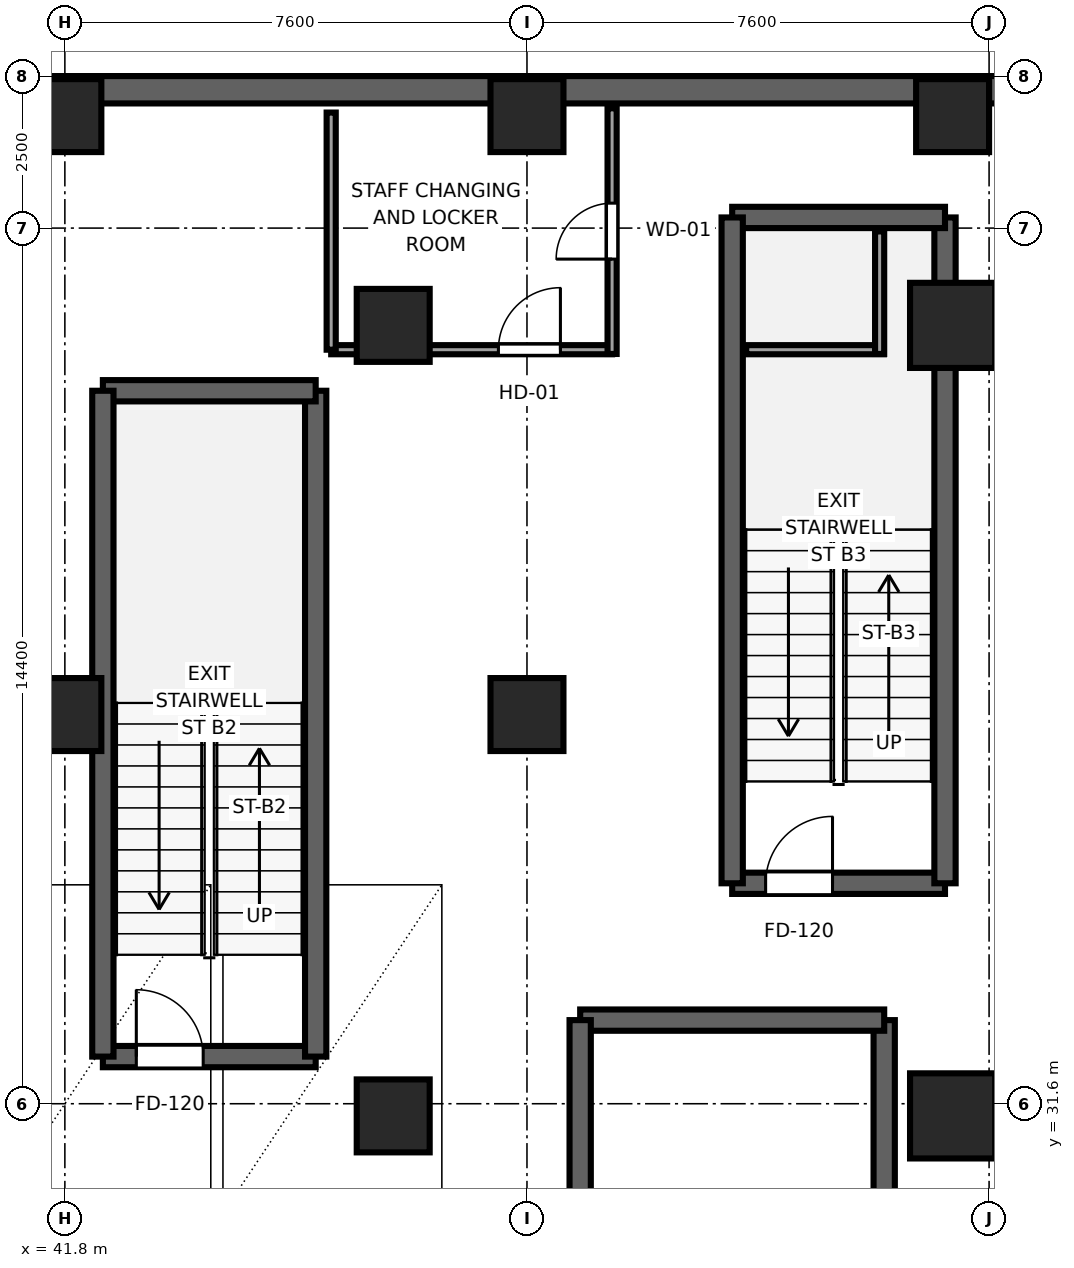
"""IFC4 building model, lengths in metres.
Left out: names, types, materials, properties, quantities, classifications, styles, units other than length and angle.
Written with IfcOpenShell. Run it as: python <this file> out.ifc"""

import sys

from ifc_helpers import new_model, si_unit, direction, frame, frame_2d, origin, origin_2d, place, context, subcontext, project, spatial, rectangle, extrude, source, transform, mapped, element, fill, save


model = new_model("IFC4")
c1 = context("Model", 3, precision=1e-05, world=origin(), true_north=direction((0.0, 1.0)))
c2 = subcontext(c1, "Body", "Model", "MODEL_VIEW")
j1 = project(units=[si_unit("LENGTHUNIT", "METRE"), si_unit("PLANEANGLEUNIT", "RADIAN")], contexts=[c1])
p1 = place(None, origin())
s1 = spatial("IfcSite", under=j1, at=p1, CompositionType="ELEMENT")
p2 = place(p1, origin())
s2 = spatial("IfcBuilding", under=s1, at=p2, CompositionType="ELEMENT")
p3 = place(p2, frame((0.0, 0.0, -9.6)))
s3 = spatial("IfcBuildingStorey", under=s2, at=p3, CompositionType="ELEMENT", Elevation=-9.6)
p4 = place(p3, frame((42.425, 32.375, 0.0), z_axis=(0.0, 0.0, 1.0), x_axis=(1.0, 0.0, 0.0)))
e1 = element("IfcWall", 1, at=p4, inside=s3, PredefinedType="SHEAR", context=c2, shape_type="SweptSolid", body=[
    extrude(rectangle(XDim=3.5, YDim=0.35, at=frame_2d((1.75, 0.0))), origin(), (0.0, 0.0, 1.0), 4.8),
])
p5 = place(p4, frame((0.55, 0.0, 0.0)))
e2 = element("IfcOpeningElement", 2, at=p5, cuts=e1, PredefinedType="OPENING", context=c2, shape_type="SweptSolid", body=[
    extrude(rectangle(XDim=1.1, YDim=2.12, at=frame_2d((0.55, 1.06))), frame((0.0, 0.185, 0.0), z_axis=(0.0, -1.0, 0.0), x_axis=(1.0, 0.0, 0.0)), (0.0, 0.0, 1.0), 0.37),
])
p6 = place(p3, frame((45.925, 32.375, 0.0), z_axis=(0.0, 0.0, 1.0), x_axis=(0.0, 1.0, 0.0)))
e3 = element("IfcWall", 3, at=p6, inside=s3, PredefinedType="SHEAR", context=c2, shape_type="SweptSolid", body=[
    extrude(rectangle(XDim=10.95, YDim=0.35, at=frame_2d((5.475, 0.0))), origin(), (0.0, 0.0, 1.0), 4.8),
])
p7 = place(p3, frame((45.925, 43.325, 0.0), z_axis=(0.0, 0.0, 1.0), x_axis=(-1.0, 0.0, 0.0)))
e4 = element("IfcWall", 4, at=p7, inside=s3, PredefinedType="SHEAR", context=c2, shape_type="SweptSolid", body=[
    extrude(rectangle(XDim=3.5, YDim=0.35, at=frame_2d((1.75, 0.0))), origin(), (0.0, 0.0, 1.0), 4.8),
])
p8 = place(p3, frame((42.425, 43.325, 0.0), z_axis=(0.0, 0.0, 1.0), x_axis=(0.0, -1.0, 0.0)))
e5 = element("IfcWall", 5, at=p8, inside=s3, PredefinedType="SHEAR", context=c2, shape_type="SweptSolid", body=[
    extrude(rectangle(XDim=10.95, YDim=0.35, at=frame_2d((5.475, 0.0))), origin(), (0.0, 0.0, 1.0), 4.8),
])
p9 = place(p3, frame((52.775, 35.225, 0.0), z_axis=(0.0, 0.0, 1.0), x_axis=(1.0, 0.0, 0.0)))
e6 = element("IfcWall", 6, at=p9, inside=s3, PredefinedType="SHEAR", context=c2, shape_type="SweptSolid", body=[
    extrude(rectangle(XDim=3.5, YDim=0.35, at=frame_2d((1.75, 0.0))), origin(), (0.0, 0.0, 1.0), 4.8),
])
p10 = place(p9, frame((0.55, 0.0, 0.0)))
e7 = element("IfcOpeningElement", 7, at=p10, cuts=e6, PredefinedType="OPENING", context=c2, shape_type="SweptSolid", body=[
    extrude(rectangle(XDim=1.1, YDim=2.12, at=frame_2d((0.55, 1.06))), frame((0.0, 0.185, 0.0), z_axis=(0.0, -1.0, 0.0), x_axis=(1.0, 0.0, 0.0)), (0.0, 0.0, 1.0), 0.37),
])
p11 = place(p3, frame((56.275, 35.225, 0.0), z_axis=(0.0, 0.0, 1.0), x_axis=(0.0, 1.0, 0.0)))
e8 = element("IfcWall", 8, at=p11, inside=s3, PredefinedType="SHEAR", context=c2, shape_type="SweptSolid", body=[
    extrude(rectangle(XDim=10.95, YDim=0.35, at=frame_2d((5.475, 0.0))), origin(), (0.0, 0.0, 1.0), 4.8),
])
p12 = place(p3, frame((56.275, 46.175, 0.0), z_axis=(0.0, 0.0, 1.0), x_axis=(-1.0, 0.0, 0.0)))
e9 = element("IfcWall", 9, at=p12, inside=s3, PredefinedType="SHEAR", context=c2, shape_type="SweptSolid", body=[
    extrude(rectangle(XDim=3.5, YDim=0.35, at=frame_2d((1.75, 0.0))), origin(), (0.0, 0.0, 1.0), 4.8),
])
p13 = place(p3, frame((52.775, 46.175, 0.0), z_axis=(0.0, 0.0, 1.0), x_axis=(0.0, -1.0, 0.0)))
e10 = element("IfcWall", 10, at=p13, inside=s3, PredefinedType="SHEAR", context=c2, shape_type="SweptSolid", body=[
    extrude(rectangle(XDim=10.95, YDim=0.35, at=frame_2d((5.475, 0.0))), origin(), (0.0, 0.0, 1.0), 4.8),
])
p14 = place(p3, frame((55.275, 20.025, 0.0), z_axis=(0.0, 0.0, 1.0), x_axis=(0.0, 1.0, 0.0)))
e11 = element("IfcWall", 11, at=p14, inside=s3, PredefinedType="SHEAR", context=c2, shape_type="SweptSolid", body=[
    extrude(rectangle(XDim=12.95, YDim=0.35, at=frame_2d((6.475, 0.0))), origin(), (0.0, 0.0, 1.0), 4.8),
])
p15 = place(p3, frame((55.275, 32.975, 0.0), z_axis=(0.0, 0.0, 1.0), x_axis=(-1.0, 0.0, 0.0)))
e12 = element("IfcWall", 12, at=p15, inside=s3, PredefinedType="SHEAR", context=c2, shape_type="SweptSolid", body=[
    extrude(rectangle(XDim=5.0, YDim=0.35, at=frame_2d((2.5, 0.0))), origin(), (0.0, 0.0, 1.0), 4.8),
])
p16 = place(p3, frame((50.275, 32.975, 0.0), z_axis=(0.0, 0.0, 1.0), x_axis=(0.0, -1.0, 0.0)))
e13 = element("IfcWall", 13, at=p16, inside=s3, PredefinedType="SHEAR", context=c2, shape_type="SweptSolid", body=[
    extrude(rectangle(XDim=12.95, YDim=0.35, at=frame_2d((6.475, 0.0))), origin(), (0.0, 0.0, 1.0), 4.8),
])
p17 = place(p3, frame((-8.4, 48.275, 0.0), z_axis=(0.0, 0.0, 1.0), x_axis=(1.0, 0.0, 0.0)))
e14 = element("IfcWall", 14, at=p17, inside=s3, PredefinedType="SOLIDWALL", context=c2, shape_type="SweptSolid", body=[
    extrude(rectangle(XDim=73.8, YDim=0.45, at=frame_2d((36.9, 0.0))), origin(), (0.0, 0.0, 1.0), 4.8),
])
m1 = source(origin(), c2, "Body", "SweptSolid", [
    extrude(rectangle(XDim=1.2, YDim=1.2, at=origin_2d()), origin(), (0.0, 0.0, 1.0), 4.8),
])
p18 = place(p3, frame((47.2, 31.4, 0.0), z_axis=(0.0, 0.0, 1.0), x_axis=(1.0, 0.0, 0.0)))
e15 = element("IfcColumn", 15, at=p18, inside=s3, PredefinedType="COLUMN", context=c2, shape_type="MappedRepresentation", body=[
    mapped(m1, transform((0.0, 0.0, 0.0), x_axis=(1.0, 0.0, 0.0), y_axis=(0.0, 1.0, 0.0), z_axis=(0.0, 0.0, 1.0), scale=1.0)),
])
m2 = source(origin(), c2, "Body", "SweptSolid", [
    extrude(rectangle(XDim=1.4, YDim=1.4, at=origin_2d()), origin(), (0.0, 0.0, 1.0), 4.8),
])
p19 = place(p3, frame((56.4, 31.4, 0.0), z_axis=(0.0, 0.0, 1.0), x_axis=(1.0, 0.0, 0.0)))
e16 = element("IfcColumn", 16, at=p19, inside=s3, PredefinedType="COLUMN", context=c2, shape_type="MappedRepresentation", body=[
    mapped(m2, transform((0.0, 0.0, 0.0), x_axis=(1.0, 0.0, 0.0), y_axis=(0.0, 1.0, 0.0), z_axis=(0.0, 0.0, 1.0), scale=1.0)),
])
p20 = place(p3, frame((47.2, 44.4, 0.0), z_axis=(0.0, 0.0, 1.0), x_axis=(1.0, 0.0, 0.0)))
e17 = element("IfcColumn", 17, at=p20, inside=s3, PredefinedType="COLUMN", context=c2, shape_type="MappedRepresentation", body=[
    mapped(m1, transform((0.0, 0.0, 0.0), x_axis=(1.0, 0.0, 0.0), y_axis=(0.0, 1.0, 0.0), z_axis=(0.0, 0.0, 1.0), scale=1.0)),
])
p21 = place(p3, frame((56.4, 44.4, 0.0), z_axis=(0.0, 0.0, 1.0), x_axis=(1.0, 0.0, 0.0)))
e18 = element("IfcColumn", 18, at=p21, inside=s3, PredefinedType="COLUMN", context=c2, shape_type="MappedRepresentation", body=[
    mapped(m2, transform((0.0, 0.0, 0.0), x_axis=(1.0, 0.0, 0.0), y_axis=(0.0, 1.0, 0.0), z_axis=(0.0, 0.0, 1.0), scale=1.0)),
])
for number, where, z_axis, x_axis in (
    (19, (41.8, 47.85, 0.0), (0.0, 0.0, 1.0), (1.0, 0.0, 0.0)),
    (20, (49.4, 47.85, 0.0), (0.0, 0.0, 1.0), (1.0, 0.0, 0.0)),
    (21, (56.4, 47.85, 0.0), (0.0, 0.0, 1.0), (1.0, 0.0, 0.0)),
    (22, (41.8, 38.0, 0.0), (0.0, 0.0, 1.0), (1.0, 0.0, 0.0)),
    (23, (49.4, 38.0, 0.0), (0.0, 0.0, 1.0), (1.0, 0.0, 0.0)),
):
    element("IfcColumn", number, at=place(p3, frame(where, z_axis=z_axis, x_axis=x_axis)), inside=s3, PredefinedType="COLUMN", context=c2, shape_type="MappedRepresentation", body=[
        mapped(m1, transform((0.0, 0.0, 0.0), x_axis=(1.0, 0.0, 0.0), y_axis=(0.0, 1.0, 0.0), z_axis=(0.0, 0.0, 1.0), scale=1.0)),
    ])
p22 = place(p3, frame((46.18, 44.0, 0.0), z_axis=(0.0, 0.0, 1.0), x_axis=(1.0, 0.0, 0.0)))
e24 = element("IfcWall", 24, at=p22, inside=s3, PredefinedType="PARTITIONING", context=c2, shape_type="SweptSolid", body=[
    extrude(rectangle(XDim=4.62, YDim=0.15, at=frame_2d((2.31, 0.0))), origin(), (0.0, 0.0, 1.0), 4.54),
])
p23 = place(p22, frame((2.75, 0.0, 0.0)))
e25 = element("IfcOpeningElement", 25, at=p23, cuts=e24, PredefinedType="OPENING", context=c2, shape_type="SweptSolid", body=[
    extrude(rectangle(XDim=1.02, YDim=2.03, at=frame_2d((0.51, 1.015))), frame((0.0, 0.085, 0.0), z_axis=(0.0, -1.0, 0.0), x_axis=(1.0, 0.0, 0.0)), (0.0, 0.0, 1.0), 0.17),
])
p24 = place(p3, frame((46.18, 44.0, 0.0), z_axis=(0.0, 0.0, 1.0), x_axis=(0.0, 1.0, 0.0)))
e26 = element("IfcWall", 26, at=p24, inside=s3, PredefinedType="PARTITIONING", context=c2, shape_type="SweptSolid", body=[
    extrude(rectangle(XDim=3.9, YDim=0.15, at=frame_2d((1.95, 0.0))), origin(), (0.0, 0.0, 1.0), 4.54),
])
p25 = place(p3, frame((50.8, 43.93, 0.0), z_axis=(0.0, 0.0, 1.0), x_axis=(0.0, 1.0, 0.0)))
e27 = element("IfcWall", 27, at=p25, inside=s3, PredefinedType="PARTITIONING", context=c2, shape_type="SweptSolid", body=[
    extrude(rectangle(XDim=4.04, YDim=0.15, at=frame_2d((2.02, 0.0))), origin(), (0.0, 0.0, 1.0), 4.54),
])
p26 = place(p25, frame((1.56, 0.0, 0.0)))
e28 = element("IfcOpeningElement", 28, at=p26, cuts=e27, PredefinedType="OPENING", context=c2, shape_type="SweptSolid", body=[
    extrude(rectangle(XDim=0.92, YDim=2.01, at=frame_2d((0.46, 1.005))), frame((0.0, 0.085, 0.0), z_axis=(0.0, -1.0, 0.0), x_axis=(1.0, 0.0, 0.0)), (0.0, 0.0, 1.0), 0.17),
])
p27 = place(p3, frame((53.005, 44.0, 0.0), z_axis=(0.0, 0.0, 1.0), x_axis=(1.0, 0.0, 0.0)))
e29 = element("IfcWall", 29, at=p27, inside=s3, PredefinedType="PARTITIONING", context=c2, shape_type="SweptSolid", body=[
    extrude(rectangle(XDim=2.265, YDim=0.15, at=frame_2d((1.133, 0.0))), origin(), (0.0, 0.0, 1.0), 4.54),
])
p28 = place(p3, frame((55.2, 43.93, 0.0), z_axis=(0.0, 0.0, 1.0), x_axis=(0.0, 1.0, 0.0)))
e30 = element("IfcWall", 30, at=p28, inside=s3, PredefinedType="PARTITIONING", context=c2, shape_type="SweptSolid", body=[
    extrude(rectangle(XDim=2.015, YDim=0.15, at=frame_2d((1.008, 0.0))), origin(), (0.0, 0.0, 1.0), 4.54),
])
m3 = source(origin(), c2, "Body", "SweptSolid", [
    extrude(rectangle(XDim=1.1, YDim=2.12, at=frame_2d((0.55, 1.06))), frame((0.0, 0.025, 0.0), z_axis=(0.0, -1.0, 0.0), x_axis=(1.0, 0.0, 0.0)), (0.0, 0.0, 1.0), 0.05),
])
p29 = place(p5, origin())
e31 = element("IfcDoor", 31, at=p29, inside=s3, OperationType="SINGLE_SWING_LEFT", PredefinedType="DOOR", context=c2, shape_type="MappedRepresentation", body=[
    mapped(m3, transform((0.0, 0.0, 0.0), x_axis=(1.0, 0.0, 0.0), y_axis=(0.0, 1.0, 0.0), z_axis=(0.0, 0.0, 1.0), scale=1.0)),
])
fill(e2, e31)
p30 = place(p10, origin())
e32 = element("IfcDoor", 32, at=p30, inside=s3, OperationType="SINGLE_SWING_RIGHT", PredefinedType="DOOR", context=c2, shape_type="MappedRepresentation", body=[
    mapped(m3, transform((0.0, 0.0, 0.0), x_axis=(1.0, 0.0, 0.0), y_axis=(0.0, 1.0, 0.0), z_axis=(0.0, 0.0, 1.0), scale=1.0)),
])
fill(e7, e32)
m4 = source(origin(), c2, "Body", "SweptSolid", [
    extrude(rectangle(XDim=1.02, YDim=2.03, at=frame_2d((0.51, 1.015))), frame((0.0, 0.025, 0.0), z_axis=(0.0, -1.0, 0.0), x_axis=(1.0, 0.0, 0.0)), (0.0, 0.0, 1.0), 0.05),
])
p31 = place(p23, origin())
e33 = element("IfcDoor", 33, at=p31, inside=s3, OperationType="SINGLE_SWING_RIGHT", PredefinedType="DOOR", context=c2, shape_type="MappedRepresentation", body=[
    mapped(m4, transform((0.0, 0.0, 0.0), x_axis=(1.0, 0.0, 0.0), y_axis=(0.0, 1.0, 0.0), z_axis=(0.0, 0.0, 1.0), scale=1.0)),
])
fill(e25, e33)
m5 = source(origin(), c2, "Body", "SweptSolid", [
    extrude(rectangle(XDim=0.92, YDim=2.01, at=frame_2d((0.46, 1.005))), frame((0.0, 0.025, 0.0), z_axis=(0.0, -1.0, 0.0), x_axis=(1.0, 0.0, 0.0)), (0.0, 0.0, 1.0), 0.05),
])
p32 = place(p26, origin())
e34 = element("IfcDoor", 34, at=p32, inside=s3, OperationType="SINGLE_SWING_LEFT", PredefinedType="DOOR", context=c2, shape_type="MappedRepresentation", body=[
    mapped(m5, transform((0.0, 0.0, 0.0), x_axis=(1.0, 0.0, 0.0), y_axis=(0.0, 1.0, 0.0), z_axis=(0.0, 0.0, 1.0), scale=1.0)),
])
fill(e28, e34)
save(model, sys.argv[1])
